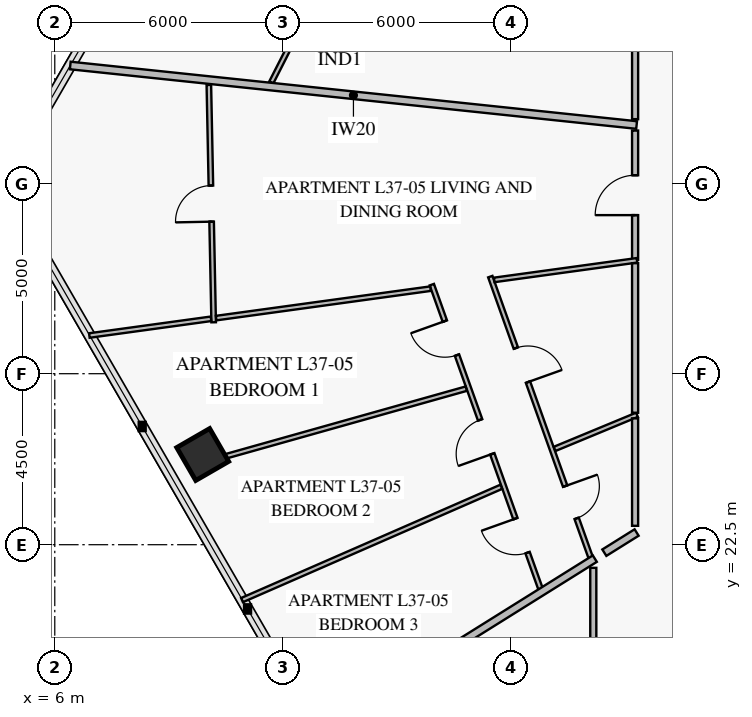
"""IFC4 building model, lengths in metres.
Left out: names, types, materials, properties, quantities, classifications, styles, units other than length and angle.
Written with IfcOpenShell. Run it as: python <this file> out.ifc"""

import sys

from ifc_helpers import new_model, si_unit, direction, frame, frame_2d, origin, origin_2d, place, context, subcontext, project, spatial, rectangle, extrude, element, fill, save


model = new_model("IFC4")
c1 = context("Model", 3, precision=1e-05, world=origin(), true_north=direction((0.0, 1.0)))
c2 = subcontext(c1, "Body", "Model", "MODEL_VIEW")
j1 = project(units=[si_unit("LENGTHUNIT", "METRE"), si_unit("PLANEANGLEUNIT", "RADIAN")], contexts=[c1])
p1 = place(None, origin())
s1 = spatial("IfcSite", under=j1, at=p1, CompositionType="ELEMENT")
p2 = place(p1, origin())
s2 = spatial("IfcBuilding", under=s1, at=p2, CompositionType="ELEMENT")
p3 = place(p2, frame((0.0, 0.0, 150.4)))
s3 = spatial("IfcBuildingStorey", under=s2, at=p3, CompositionType="ELEMENT", Elevation=150.4)
p4 = place(p3, frame((9.892, 24.874, 0.0), z_axis=(0.0, 0.0, 1.0), x_axis=(0.5, -0.866025403784, 0.0)))
e1 = element("IfcColumn", 1, at=p4, inside=s3, PredefinedType="COLUMN", context=c2, shape_type="SweptSolid", body=[
    extrude(rectangle(XDim=1.0, YDim=1.0, at=origin_2d()), origin(), (0.0, 0.0, 1.0), 3.55),
])
p5 = place(p3, frame((15.971, 43.052, 0.0), z_axis=(0.0, 0.0, 1.0), x_axis=(-0.453998461699, -0.891002467323, 0.0)))
e2 = element("IfcWall", 2, at=p5, inside=s3, PredefinedType="PARTITIONING", context=c2, shape_type="SweptSolid", body=[
    extrude(rectangle(XDim=9.41, YDim=0.12, at=frame_2d((4.705, 0.0))), origin(), (0.0, 0.0, 1.0), 2.9),
])
p6 = place(p5, frame((1.923, 0.0, 0.0)))
e3 = element("IfcOpeningElement", 3, at=p6, cuts=e2, PredefinedType="OPENING", context=c2, shape_type="SweptSolid", body=[
    extrude(rectangle(XDim=0.95, YDim=2.1, at=frame_2d((0.475, 1.05))), frame((0.0, 0.072, 0.0), z_axis=(0.0, -1.0, 0.0), x_axis=(1.0, 0.0, 0.0)), (0.0, 0.0, 1.0), 0.144),
])
p7 = place(p5, frame((6.386, 0.0, 0.0)))
e4 = element("IfcOpeningElement", 4, at=p7, cuts=e2, PredefinedType="OPENING", context=c2, shape_type="SweptSolid", body=[
    extrude(rectangle(XDim=0.95, YDim=2.1, at=frame_2d((0.475, 1.05))), frame((0.0, 0.072, 0.0), z_axis=(0.0, -1.0, 0.0), x_axis=(1.0, 0.0, 0.0)), (0.0, 0.0, 1.0), 0.144),
])
p8 = place(p3, frame((21.27, 40.021, 0.0), z_axis=(0.0, 0.0, 1.0), x_axis=(0.0, -1.0, 0.0)))
e5 = element("IfcWall", 5, at=p8, inside=s3, PredefinedType="PARTITIONING", context=c2, shape_type="SweptSolid", body=[
    extrude(rectangle(XDim=6.323, YDim=0.16, at=frame_2d((3.162, 0.0))), origin(), (0.0, 0.0, 1.0), 2.9),
])
p9 = place(p8, frame((2.637, 0.0, 0.0)))
e6 = element("IfcOpeningElement", 6, at=p9, cuts=e5, PredefinedType="OPENING", context=c2, shape_type="SweptSolid", body=[
    extrude(rectangle(XDim=1.05, YDim=2.15, at=frame_2d((0.525, 1.075))), frame((0.0, 0.092, 0.0), z_axis=(0.0, -1.0, 0.0), x_axis=(1.0, 0.0, 0.0)), (0.0, 0.0, 1.0), 0.184),
])
p10 = place(p3, frame((10.054, 34.599, 0.0), z_axis=(0.0, 0.0, 1.0), x_axis=(0.020243671552, -0.999795075884, 0.0)))
e7 = element("IfcWall", 7, at=p10, inside=s3, PredefinedType="PARTITIONING", context=c2, shape_type="SweptSolid", body=[
    extrude(rectangle(XDim=6.247, YDim=0.12, at=frame_2d((3.124, 0.0))), origin(), (0.0, 0.0, 1.0), 2.87),
])
p11 = place(p10, frame((2.648, 0.0, 0.0)))
e8 = element("IfcOpeningElement", 8, at=p11, cuts=e7, PredefinedType="OPENING", context=c2, shape_type="SweptSolid", body=[
    extrude(rectangle(XDim=0.95, YDim=2.1, at=frame_2d((0.475, 1.05))), frame((0.0, 0.072, 0.0), z_axis=(0.0, -1.0, 0.0), x_axis=(1.0, 0.0, 0.0)), (0.0, 0.0, 1.0), 0.144),
])
p12 = place(p3, frame((17.46, 29.555, 0.0), z_axis=(0.0, 0.0, 1.0), x_axis=(0.336444483984, -0.941703302106, 0.0)))
e9 = element("IfcWall", 9, at=p12, inside=s3, PredefinedType="PARTITIONING", context=c2, shape_type="SweptSolid", body=[
    extrude(rectangle(XDim=7.87, YDim=0.12, at=frame_2d((3.935, 0.0))), origin(), (0.0, 0.0, 1.0), 2.9),
])
p13 = place(p12, frame((1.997, 0.0, 0.0)))
e10 = element("IfcOpeningElement", 10, at=p13, cuts=e9, PredefinedType="OPENING", context=c2, shape_type="SweptSolid", body=[
    extrude(rectangle(XDim=0.95, YDim=2.1, at=frame_2d((0.475, 1.05))), frame((0.0, 0.072, 0.0), z_axis=(0.0, -1.0, 0.0), x_axis=(1.0, 0.0, 0.0)), (0.0, 0.0, 1.0), 0.144),
])
p14 = place(p12, frame((5.855, 0.0, 0.0)))
e11 = element("IfcOpeningElement", 11, at=p14, cuts=e9, PredefinedType="OPENING", context=c2, shape_type="SweptSolid", body=[
    extrude(rectangle(XDim=0.9, YDim=2.1, at=frame_2d((0.45, 1.05))), frame((0.0, 0.072, 0.0), z_axis=(0.0, -1.0, 0.0), x_axis=(1.0, 0.0, 0.0)), (0.0, 0.0, 1.0), 0.144),
])
p15 = place(p3, frame((15.921, 29.343, 0.0), z_axis=(0.0, 0.0, 1.0), x_axis=(0.336440023532, -0.941704895689, 0.0)))
e12 = element("IfcWall", 12, at=p15, inside=s3, PredefinedType="PARTITIONING", context=c2, shape_type="SweptSolid", body=[
    extrude(rectangle(XDim=8.507, YDim=0.12, at=frame_2d((4.253, 0.0))), origin(), (0.0, 0.0, 1.0), 2.9),
])
p16 = place(p15, frame((1.019, 0.0, 0.0)))
e13 = element("IfcOpeningElement", 13, at=p16, cuts=e12, PredefinedType="OPENING", context=c2, shape_type="SweptSolid", body=[
    extrude(rectangle(XDim=0.95, YDim=2.1, at=frame_2d((0.475, 1.05))), frame((0.0, 0.072, 0.0), z_axis=(0.0, -1.0, 0.0), x_axis=(1.0, 0.0, 0.0)), (0.0, 0.0, 1.0), 0.144),
])
p17 = place(p15, frame((3.779, 0.0, 0.0)))
e14 = element("IfcOpeningElement", 14, at=p17, cuts=e12, PredefinedType="OPENING", context=c2, shape_type="SweptSolid", body=[
    extrude(rectangle(XDim=0.95, YDim=2.1, at=frame_2d((0.475, 1.05))), frame((0.0, 0.072, 0.0), z_axis=(0.0, -1.0, 0.0), x_axis=(1.0, 0.0, 0.0)), (0.0, 0.0, 1.0), 0.144),
])
p18 = place(p15, frame((6.538, 0.0, 0.0)))
e15 = element("IfcOpeningElement", 15, at=p18, cuts=e12, PredefinedType="OPENING", context=c2, shape_type="SweptSolid", body=[
    extrude(rectangle(XDim=0.95, YDim=2.1, at=frame_2d((0.475, 1.05))), frame((0.0, 0.072, 0.0), z_axis=(0.0, -1.0, 0.0), x_axis=(1.0, 0.0, 0.0)), (0.0, 0.0, 1.0), 0.144),
])
p19 = place(p3, frame((21.27, 33.398, 0.0), z_axis=(0.0, 0.0, 1.0), x_axis=(0.0, -1.0, 0.0)))
e16 = element("IfcWall", 16, at=p19, inside=s3, PredefinedType="PARTITIONING", context=c2, shape_type="SweptSolid", body=[
    extrude(rectangle(XDim=3.401, YDim=0.16, at=frame_2d((1.7, 0.0))), origin(), (0.0, 0.0, 1.0), 3.55),
])
p20 = place(p19, frame((1.176, 0.0, 0.0)))
e17 = element("IfcOpeningElement", 17, at=p20, cuts=e16, PredefinedType="OPENING", context=c2, shape_type="SweptSolid", body=[
    extrude(rectangle(XDim=1.05, YDim=2.15, at=frame_2d((0.525, 1.075))), frame((0.0, 0.092, 0.0), z_axis=(0.0, -1.0, 0.0), x_axis=(1.0, 0.0, 0.0)), (0.0, 0.0, 1.0), 0.184),
])
p21 = place(p3, frame((21.31, 33.544, 0.0), z_axis=(0.0, 0.0, 1.0), x_axis=(-0.994521332404, 0.104533819379, 0.0)))
e18 = element("IfcWall", 18, at=p21, inside=s3, PredefinedType="PARTITIONING", context=c2, shape_type="SweptSolid", body=[
    extrude(rectangle(XDim=14.985, YDim=0.2, at=frame_2d((7.492, 0.0))), origin(), (0.0, 0.0, 1.0), 2.87),
])
p22 = place(p3, frame((21.32, 25.919, 0.0), z_axis=(0.0, 0.0, 1.0), x_axis=(-0.923865947443, -0.382716227975, 0.0)))
e19 = element("IfcWall", 19, at=p22, inside=s3, PredefinedType="PARTITIONING", context=c2, shape_type="SweptSolid", body=[
    extrude(rectangle(XDim=2.347, YDim=0.12, at=frame_2d((1.173, 0.0))), origin(), (0.0, 0.0, 1.0), 3.55),
])
p23 = place(p3, frame((16.827, 26.606, 0.0), z_axis=(0.0, 0.0, 1.0), x_axis=(-0.96262766067, -0.270828334767, 0.0)))
e20 = element("IfcWall", 20, at=p23, inside=s3, PredefinedType="PARTITIONING", context=c2, shape_type="SweptSolid", body=[
    extrude(rectangle(XDim=6.664, YDim=0.12, at=frame_2d((3.332, 0.0))), origin(), (0.0, 0.0, 1.0), 2.9),
])
p24 = place(p3, frame((17.749, 24.024, 0.0), z_axis=(0.0, 0.0, 1.0), x_axis=(-0.916318302779, -0.40045070607, 0.0)))
e21 = element("IfcWall", 21, at=p24, inside=s3, PredefinedType="PARTITIONING", context=c2, shape_type="SweptSolid", body=[
    extrude(rectangle(XDim=7.446, YDim=0.12, at=frame_2d((3.723, 0.0))), origin(), (0.0, 0.0, 1.0), 2.87),
])
p25 = place(p3, frame((21.32, 29.984, 0.0), z_axis=(0.0, 0.0, 1.0), x_axis=(-0.990693713304, -0.136110126076, 0.0)))
e22 = element("IfcWall", 22, at=p25, inside=s3, PredefinedType="PARTITIONING", context=c2, shape_type="SweptSolid", body=[
    extrude(rectangle(XDim=3.792, YDim=0.12, at=frame_2d((1.896, 0.0))), origin(), (0.0, 0.0, 1.0), 3.55),
])
p26 = place(p3, frame((15.887, 29.238, 0.0), z_axis=(0.0, 0.0, 1.0), x_axis=(-0.990693446478, -0.136112068181, 0.0)))
e23 = element("IfcWall", 23, at=p26, inside=s3, PredefinedType="PARTITIONING", context=c2, shape_type="SweptSolid", body=[
    extrude(rectangle(XDim=5.693, YDim=0.12, at=frame_2d((2.847, 0.0))), origin(), (0.0, 0.0, 1.0), 3.55),
])
p27 = place(p3, frame((10.111, 28.444, 0.0), z_axis=(0.0, 0.0, 1.0), x_axis=(-0.990699601651, -0.136067260167, 0.0)))
e24 = element("IfcWall", 24, at=p27, inside=s3, PredefinedType="PARTITIONING", context=c2, shape_type="SweptSolid", body=[
    extrude(rectangle(XDim=3.231, YDim=0.12, at=frame_2d((1.616, 0.0))), origin(), (0.0, 0.0, 1.0), 2.87),
])
p28 = place(p3, frame((21.31, 22.821, 0.0), z_axis=(0.0, 0.0, 1.0), x_axis=(-0.848039384523, -0.529933205506, 0.0)))
e25 = element("IfcWall", 25, at=p28, inside=s3, PredefinedType="PARTITIONING", context=c2, shape_type="SweptSolid", body=[
    extrude(rectangle(XDim=1.001, YDim=0.2, at=frame_2d((0.501, 0.0))), origin(), (0.0, 0.0, 1.0), 3.55),
])
p29 = place(p3, frame((20.21, 22.133, 0.0), z_axis=(0.0, 0.0, 1.0), x_axis=(-0.848051050333, -0.529914536534, 0.0)))
e26 = element("IfcWall", 26, at=p29, inside=s3, PredefinedType="PARTITIONING", context=c2, shape_type="SweptSolid", body=[
    extrude(rectangle(XDim=8.58, YDim=0.2, at=frame_2d((4.29, 0.0))), origin(), (0.0, 0.0, 1.0), 2.87),
])
p30 = place(p3, frame((21.27, 29.908, 0.0), z_axis=(0.0, 0.0, 1.0), x_axis=(0.0, -1.0, 0.0)))
e27 = element("IfcWall", 27, at=p30, inside=s3, PredefinedType="PARTITIONING", context=c2, shape_type="SweptSolid", body=[
    extrude(rectangle(XDim=3.937, YDim=0.16, at=frame_2d((1.968, 0.0))), origin(), (0.0, 0.0, 1.0), 2.9),
])
p31 = place(p3, frame((21.27, 25.825, 0.0), z_axis=(0.0, 0.0, 1.0), x_axis=(0.0, -1.0, 0.0)))
e28 = element("IfcWall", 28, at=p31, inside=s3, PredefinedType="PARTITIONING", context=c2, shape_type="SweptSolid", body=[
    extrude(rectangle(XDim=2.828, YDim=0.16, at=frame_2d((1.414, 0.0))), origin(), (0.0, 0.0, 1.0), 3.55),
])
p32 = place(p3, frame((20.17, 21.892, 0.0), z_axis=(0.0, 0.0, 1.0), x_axis=(0.0, -1.0, 0.0)))
e29 = element("IfcWall", 29, at=p32, inside=s3, PredefinedType="PARTITIONING", context=c2, shape_type="SweptSolid", body=[
    extrude(rectangle(XDim=3.442, YDim=0.16, at=frame_2d((1.721, 0.0))), origin(), (0.0, 0.0, 1.0), 3.15),
])
p33 = place(p11, frame((0.95, 0.0, 0.0), z_axis=(0.0, 0.0, 1.0), x_axis=(-1.0, 0.0, 0.0)))
e30 = element("IfcDoor", 30, at=p33, inside=s3, OperationType="SINGLE_SWING_LEFT", PredefinedType="DOOR", context=c2, shape_type="SweptSolid", body=[
    extrude(rectangle(XDim=0.95, YDim=2.1, at=frame_2d((0.475, 1.05))), frame((0.0, 0.025, 0.0), z_axis=(0.0, -1.0, 0.0), x_axis=(1.0, 0.0, 0.0)), (0.0, 0.0, 1.0), 0.05),
])
fill(e8, e30)
p34 = place(p13, origin())
e31 = element("IfcDoor", 31, at=p34, inside=s3, OperationType="SINGLE_SWING_RIGHT", PredefinedType="DOOR", context=c2, shape_type="SweptSolid", body=[
    extrude(rectangle(XDim=0.95, YDim=2.1, at=frame_2d((0.475, 1.05))), frame((0.0, 0.025, 0.0), z_axis=(0.0, -1.0, 0.0), x_axis=(1.0, 0.0, 0.0)), (0.0, 0.0, 1.0), 0.05),
])
fill(e10, e31)
p35 = place(p14, origin())
e32 = element("IfcDoor", 32, at=p35, inside=s3, OperationType="SINGLE_SWING_LEFT", PredefinedType="DOOR", context=c2, shape_type="SweptSolid", body=[
    extrude(rectangle(XDim=0.9, YDim=2.1, at=frame_2d((0.45, 1.05))), frame((0.0, 0.025, 0.0), z_axis=(0.0, -1.0, 0.0), x_axis=(1.0, 0.0, 0.0)), (0.0, 0.0, 1.0), 0.05),
])
fill(e11, e32)
p36 = place(p16, frame((0.95, 0.0, 0.0), z_axis=(0.0, 0.0, 1.0), x_axis=(-1.0, 0.0, 0.0)))
e33 = element("IfcDoor", 33, at=p36, inside=s3, OperationType="SINGLE_SWING_RIGHT", PredefinedType="DOOR", context=c2, shape_type="SweptSolid", body=[
    extrude(rectangle(XDim=0.95, YDim=2.1, at=frame_2d((0.475, 1.05))), frame((0.0, 0.025, 0.0), z_axis=(0.0, -1.0, 0.0), x_axis=(1.0, 0.0, 0.0)), (0.0, 0.0, 1.0), 0.05),
])
fill(e13, e33)
p37 = place(p17, frame((0.95, 0.0, 0.0), z_axis=(0.0, 0.0, 1.0), x_axis=(-1.0, 0.0, 0.0)))
e34 = element("IfcDoor", 34, at=p37, inside=s3, OperationType="SINGLE_SWING_LEFT", PredefinedType="DOOR", context=c2, shape_type="SweptSolid", body=[
    extrude(rectangle(XDim=0.95, YDim=2.1, at=frame_2d((0.475, 1.05))), frame((0.0, 0.025, 0.0), z_axis=(0.0, -1.0, 0.0), x_axis=(1.0, 0.0, 0.0)), (0.0, 0.0, 1.0), 0.05),
])
fill(e14, e34)
p38 = place(p18, frame((0.95, 0.0, 0.0), z_axis=(0.0, 0.0, 1.0), x_axis=(-1.0, 0.0, 0.0)))
e35 = element("IfcDoor", 35, at=p38, inside=s3, OperationType="SINGLE_SWING_RIGHT", PredefinedType="DOOR", context=c2, shape_type="SweptSolid", body=[
    extrude(rectangle(XDim=0.95, YDim=2.1, at=frame_2d((0.475, 1.05))), frame((0.0, 0.025, 0.0), z_axis=(0.0, -1.0, 0.0), x_axis=(1.0, 0.0, 0.0)), (0.0, 0.0, 1.0), 0.05),
])
fill(e15, e35)
p39 = place(p20, frame((1.05, 0.0, 0.0), z_axis=(0.0, 0.0, 1.0), x_axis=(-1.0, 0.0, 0.0)))
e36 = element("IfcDoor", 36, at=p39, inside=s3, OperationType="SINGLE_SWING_LEFT", PredefinedType="DOOR", context=c2, shape_type="SweptSolid", body=[
    extrude(rectangle(XDim=1.05, YDim=2.15, at=frame_2d((0.525, 1.075))), frame((0.0, 0.025, 0.0), z_axis=(0.0, -1.0, 0.0), x_axis=(1.0, 0.0, 0.0)), (0.0, 0.0, 1.0), 0.05),
])
fill(e17, e36)
save(model, sys.argv[1])
